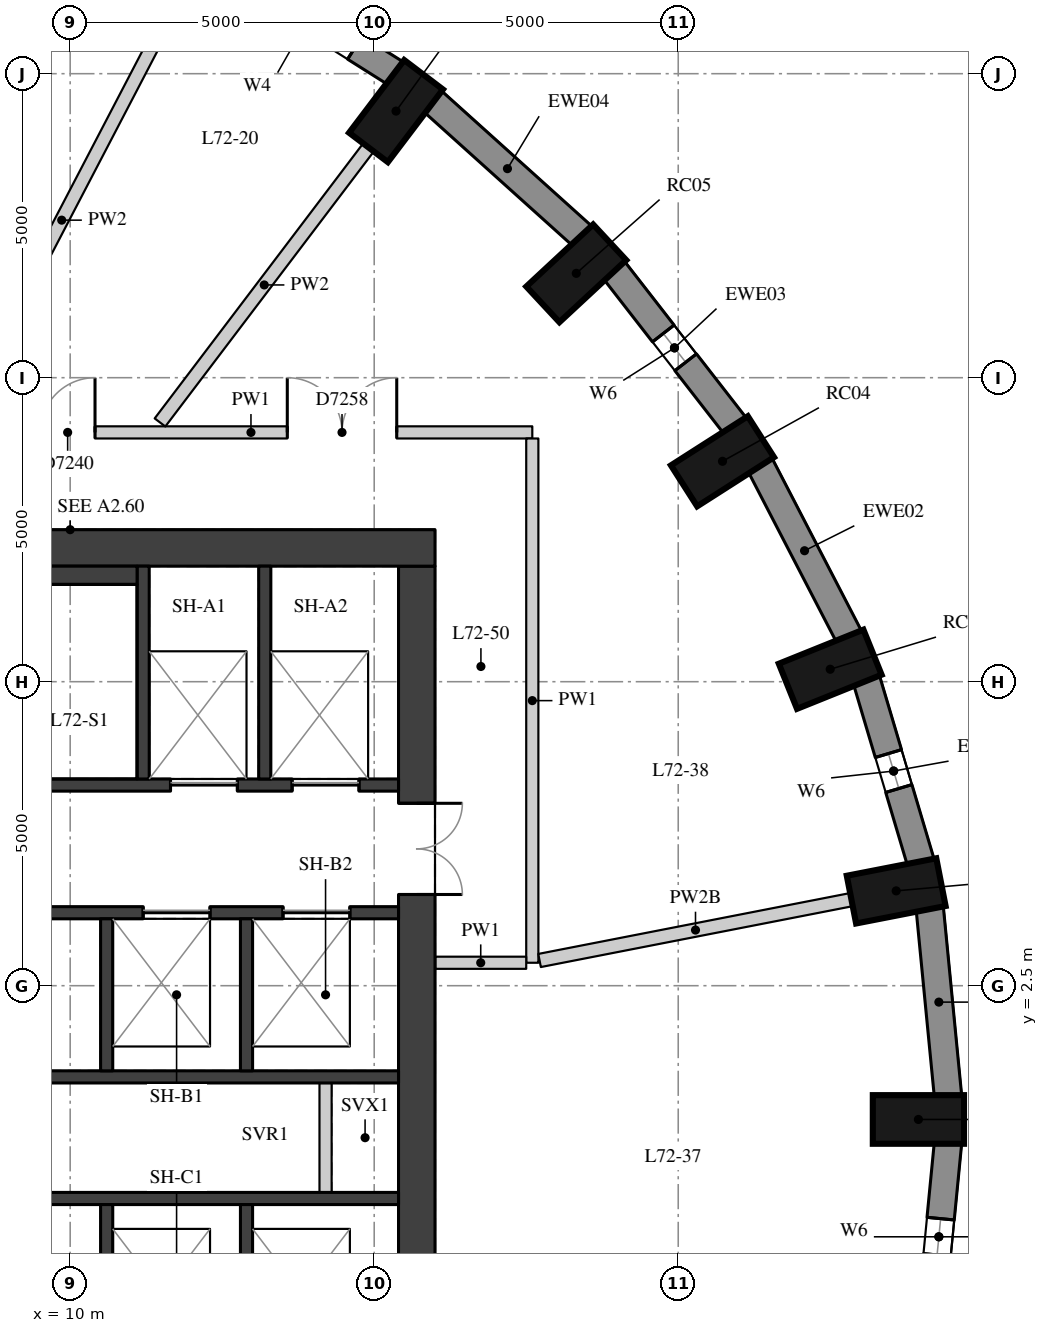
"""IFC4 building model, lengths in metres.
Left out: names, types, materials, properties, quantities, classifications, styles, units other than length and angle.
Written with IfcOpenShell. Run it as: python <this file> out.ifc"""

import sys

from ifc_helpers import new_model, si_unit, direction, frame, frame_2d, origin, origin_2d, place, context, subcontext, project, spatial, rectangle, extrude, element, fill, save


model = new_model("IFC4")
c1 = context("Model", 3, precision=1e-05, world=origin(), true_north=direction((0.0, 1.0)))
c2 = subcontext(c1, "Body", "Model", "MODEL_VIEW")
j1 = project(units=[si_unit("LENGTHUNIT", "METRE"), si_unit("PLANEANGLEUNIT", "RADIAN")], contexts=[c1])
p1 = place(None, origin())
s1 = spatial("IfcSite", under=j1, at=p1, CompositionType="ELEMENT")
p2 = place(p1, origin())
s2 = spatial("IfcBuilding", under=s1, at=p2, CompositionType="ELEMENT")
p3 = place(p2, frame((0.0, 0.0, 253.1)))
s3 = spatial("IfcBuildingStorey", under=s2, at=p3, CompositionType="ELEMENT", Elevation=253.1)
for number, where, z_axis, x_axis in (
    (1, (23.95, 0.3, 0.0), (0.0, 0.0, 1.0), (1.0, 0.0, 0.0)),
    (2, (23.585, 4.06, 0.0), (0.0, 0.0, 1.0), (0.981, 0.192, 0.0)),
    (3, (22.5, 7.705, 0.0), (0.0, 0.0, 1.0), (0.928, 0.374, 0.0)),
    (4, (20.728, 11.125, 0.0), (0.0, 0.0, 1.0), (0.843, 0.539, 0.0)),
    (5, (18.323, 14.216, 0.0), (0.0, 0.0, 1.0), (0.733, 0.681, 0.0)),
    (6, (15.359, 16.885, 0.0), (0.0, 0.0, 1.0), (0.604, 0.797, 0.0)),
):
    element("IfcColumn", number, at=place(p3, frame(where, z_axis=z_axis, x_axis=x_axis)), inside=s3, PredefinedType="COLUMN", context=c2, shape_type="SweptSolid", body=[
        extrude(rectangle(XDim=1.5, YDim=0.8, at=origin_2d()), origin(), (0.0, 0.0, 1.0), 3.3),
    ])
p4 = place(p3, frame((24.437, 0.68, 0.0), z_axis=(0.0, 0.0, 1.0), x_axis=(-0.096740086873, 0.995309678237, 0.0)))
e7 = element("IfcWall", 7, at=p4, inside=s3, PredefinedType="SOLIDWALL", context=c2, shape_type="SweptSolid", body=[
    extrude(rectangle(XDim=3.114, YDim=0.45, at=frame_2d((1.557, 0.0))), origin(), (0.0, 0.0, 1.0), 3.02),
])
p5 = place(p3, frame((23.99, 4.526, 0.0), z_axis=(0.0, 0.0, 1.0), x_axis=(-0.285263800865, 0.958449040855, 0.0)))
e8 = element("IfcWall", 8, at=p5, inside=s3, PredefinedType="SOLIDWALL", context=c2, shape_type="SweptSolid", body=[
    extrude(rectangle(XDim=3.139, YDim=0.45, at=frame_2d((1.57, 0.0))), origin(), (0.0, 0.0, 1.0), 3.02),
])
p6 = place(p5, frame((1.27, 0.0, 0.4)))
e9 = element("IfcOpeningElement", 9, at=p6, cuts=e8, PredefinedType="OPENING", context=c2, shape_type="SweptSolid", body=[
    extrude(rectangle(XDim=0.6, YDim=1.75, at=frame_2d((0.3, 0.875))), frame((0.0, 0.235, 0.0), z_axis=(0.0, -1.0, 0.0), x_axis=(1.0, 0.0, 0.0)), (0.0, 0.0, 1.0), 0.47),
])
p7 = place(p3, frame((22.81, 8.24, 0.0), z_axis=(0.0, 0.0, 1.0), x_axis=(-0.459889857669, 0.887975967475, 0.0)))
e10 = element("IfcWall", 10, at=p7, inside=s3, PredefinedType="SOLIDWALL", context=c2, shape_type="SweptSolid", body=[
    extrude(rectangle(XDim=3.186, YDim=0.45, at=frame_2d((1.593, 0.0))), origin(), (0.0, 0.0, 1.0), 3.02),
])
p8 = place(p3, frame((20.935, 11.708, 0.0), z_axis=(0.0, 0.0, 1.0), x_axis=(-0.613862536705, 0.789412937587, 0.0)))
e11 = element("IfcWall", 11, at=p8, inside=s3, PredefinedType="SOLIDWALL", context=c2, shape_type="SweptSolid", body=[
    extrude(rectangle(XDim=3.247, YDim=0.45, at=frame_2d((1.624, 0.0))), origin(), (0.0, 0.0, 1.0), 3.02),
])
p9 = place(p8, frame((1.324, 0.0, 0.4)))
e12 = element("IfcOpeningElement", 12, at=p9, cuts=e11, PredefinedType="OPENING", context=c2, shape_type="SweptSolid", body=[
    extrude(rectangle(XDim=0.6, YDim=1.75, at=frame_2d((0.3, 0.875))), frame((0.0, 0.235, 0.0), z_axis=(0.0, -1.0, 0.0), x_axis=(1.0, 0.0, 0.0)), (0.0, 0.0, 1.0), 0.47),
])
p10 = place(p3, frame((18.424, 14.828, 0.0), z_axis=(0.0, 0.0, 1.0), x_axis=(-0.743166014219, 0.669107073128, 0.0)))
e13 = element("IfcWall", 13, at=p10, inside=s3, PredefinedType="SOLIDWALL", context=c2, shape_type="SweptSolid", body=[
    extrude(rectangle(XDim=3.316, YDim=0.45, at=frame_2d((1.658, 0.0))), origin(), (0.0, 0.0, 1.0), 3.02),
])
p11 = place(p3, frame((15.353, 17.506, 0.0), z_axis=(0.0, 0.0, 1.0), x_axis=(-0.845929139811, 0.53329531258, 0.0)))
e14 = element("IfcWall", 14, at=p11, inside=s3, PredefinedType="SOLIDWALL", context=c2, shape_type="SweptSolid", body=[
    extrude(rectangle(XDim=3.385, YDim=0.45, at=frame_2d((1.692, 0.0))), origin(), (0.0, 0.0, 1.0), 3.02),
])
p12 = place(p11, frame((0.792, 0.0, 0.4)))
e15 = element("IfcOpeningElement", 15, at=p12, cuts=e14, PredefinedType="OPENING", context=c2, shape_type="SweptSolid", body=[
    extrude(rectangle(XDim=1.8, YDim=1.75, at=frame_2d((0.9, 0.875))), frame((0.0, 0.235, 0.0), z_axis=(0.0, -1.0, 0.0), x_axis=(1.0, 0.0, 0.0)), (0.0, 0.0, 1.0), 0.47),
])
p13 = place(p3, frame((24.136, -3.18, 0.0), z_axis=(0.0, 0.0, 1.0), x_axis=(0.09673253904, 0.995310411827, 0.0)))
e16 = element("IfcWall", 16, at=p13, inside=s3, PredefinedType="SOLIDWALL", context=c2, shape_type="SweptSolid", body=[
    extrude(rectangle(XDim=3.115, YDim=0.45, at=frame_2d((1.557, 0.0))), origin(), (0.0, 0.0, 1.0), 3.02),
])
p14 = place(p13, frame((1.257, 0.0, 0.4)))
e17 = element("IfcOpeningElement", 17, at=p14, cuts=e16, PredefinedType="OPENING", context=c2, shape_type="SweptSolid", body=[
    extrude(rectangle(XDim=0.6, YDim=1.75, at=frame_2d((0.3, 0.875))), frame((0.0, 0.235, 0.0), z_axis=(0.0, -1.0, 0.0), x_axis=(1.0, 0.0, 0.0)), (0.0, 0.0, 1.0), 0.47),
])
p15 = place(p3, frame((15.7, -9.4, 0.0), z_axis=(0.0, 0.0, 1.0), x_axis=(0.0, 1.0, 0.0)))
e18 = element("IfcWall", 18, at=p15, inside=s3, PredefinedType="SHEAR", context=c2, shape_type="SweptSolid", body=[
    extrude(rectangle(XDim=18.8, YDim=0.6, at=frame_2d((9.4, 0.0))), origin(), (0.0, 0.0, 1.0), 3.02),
])
p16 = place(p15, frame((13.4, 0.0, 0.0)))
e19 = element("IfcOpeningElement", 19, at=p16, cuts=e18, PredefinedType="OPENING", context=c2, shape_type="SweptSolid", body=[
    extrude(rectangle(XDim=1.5, YDim=2.1, at=frame_2d((0.75, 1.05))), frame((0.0, 0.31, 0.0), z_axis=(0.0, -1.0, 0.0), x_axis=(1.0, 0.0, 0.0)), (0.0, 0.0, 1.0), 0.62),
])
p17 = place(p15, frame((3.9, 0.0, 0.0)))
e20 = element("IfcOpeningElement", 20, at=p17, cuts=e18, PredefinedType="OPENING", context=c2, shape_type="SweptSolid", body=[
    extrude(rectangle(XDim=1.5, YDim=2.1, at=frame_2d((0.75, 1.05))), frame((0.0, 0.31, 0.0), z_axis=(0.0, -1.0, 0.0), x_axis=(1.0, 0.0, 0.0)), (0.0, 0.0, 1.0), 0.62),
])
p18 = place(p3, frame((4.0, 9.7, 0.0), z_axis=(0.0, 0.0, 1.0), x_axis=(1.0, 0.0, 0.0)))
e21 = element("IfcWall", 21, at=p18, inside=s3, PredefinedType="SHEAR", context=c2, shape_type="SweptSolid", body=[
    extrude(rectangle(XDim=12.0, YDim=0.6, at=frame_2d((6.0, 0.0))), origin(), (0.0, 0.0, 1.0), 3.02),
])
p19 = place(p3, frame((4.6, 5.8, 0.0), z_axis=(0.0, 0.0, 1.0), x_axis=(1.0, 0.0, 0.0)))
e22 = element("IfcWall", 22, at=p19, inside=s3, PredefinedType="SHEAR", context=c2, shape_type="SweptSolid", body=[
    extrude(rectangle(XDim=10.8, YDim=0.2, at=frame_2d((5.4, 0.0))), origin(), (0.0, 0.0, 1.0), 3.02),
])
p20 = place(p19, frame((7.05, 0.0, 0.0)))
e23 = element("IfcOpeningElement", 23, at=p20, cuts=e22, PredefinedType="OPENING", context=c2, shape_type="SweptSolid", body=[
    extrude(rectangle(XDim=1.1, YDim=2.1, at=frame_2d((0.55, 1.05))), frame((0.0, 0.11, 0.0), z_axis=(0.0, -1.0, 0.0), x_axis=(1.0, 0.0, 0.0)), (0.0, 0.0, 1.0), 0.22),
])
p21 = place(p19, frame((9.05, 0.0, 0.0)))
e24 = element("IfcOpeningElement", 24, at=p21, cuts=e22, PredefinedType="OPENING", context=c2, shape_type="SweptSolid", body=[
    extrude(rectangle(XDim=1.1, YDim=2.1, at=frame_2d((0.55, 1.05))), frame((0.0, 0.11, 0.0), z_axis=(0.0, -1.0, 0.0), x_axis=(1.0, 0.0, 0.0)), (0.0, 0.0, 1.0), 0.22),
])
p22 = place(p3, frame((4.6, 3.7, 0.0), z_axis=(0.0, 0.0, 1.0), x_axis=(1.0, 0.0, 0.0)))
e25 = element("IfcWall", 25, at=p22, inside=s3, PredefinedType="SHEAR", context=c2, shape_type="SweptSolid", body=[
    extrude(rectangle(XDim=10.8, YDim=0.2, at=frame_2d((5.4, 0.0))), origin(), (0.0, 0.0, 1.0), 3.02),
])
p23 = place(p22, frame((6.6, 0.0, 0.0)))
e26 = element("IfcOpeningElement", 26, at=p23, cuts=e25, PredefinedType="OPENING", context=c2, shape_type="SweptSolid", body=[
    extrude(rectangle(XDim=1.1, YDim=2.1, at=frame_2d((0.55, 1.05))), frame((0.0, 0.11, 0.0), z_axis=(0.0, -1.0, 0.0), x_axis=(1.0, 0.0, 0.0)), (0.0, 0.0, 1.0), 0.22),
])
p24 = place(p22, frame((8.9, 0.0, 0.0)))
e27 = element("IfcOpeningElement", 27, at=p24, cuts=e25, PredefinedType="OPENING", context=c2, shape_type="SweptSolid", body=[
    extrude(rectangle(XDim=1.1, YDim=2.1, at=frame_2d((0.55, 1.05))), frame((0.0, 0.11, 0.0), z_axis=(0.0, -1.0, 0.0), x_axis=(1.0, 0.0, 0.0)), (0.0, 0.0, 1.0), 0.22),
])
for number, where, z_axis, x_axis in (
    (28, (4.6, 1.0, 0.0), (0.0, 0.0, 1.0), (1.0, 0.0, 0.0)),
    (29, (4.6, -1.0, 0.0), (0.0, 0.0, 1.0), (1.0, 0.0, 0.0)),
):
    element("IfcWall", number, at=place(p3, frame(where, z_axis=z_axis, x_axis=x_axis)), inside=s3, PredefinedType="SHEAR", context=c2, shape_type="SweptSolid", body=[
        extrude(rectangle(XDim=10.8, YDim=0.2, at=frame_2d((5.4, 0.0))), origin(), (0.0, 0.0, 1.0), 3.02),
    ])
for number, where, z_axis, x_axis in (
    (30, (11.2, 5.9, 0.0), (0.0, 0.0, 1.0), (0.0, 1.0, 0.0)),
    (31, (13.2, 5.9, 0.0), (0.0, 0.0, 1.0), (0.0, 1.0, 0.0)),
):
    element("IfcWall", number, at=place(p3, frame(where, z_axis=z_axis, x_axis=x_axis)), inside=s3, PredefinedType="SHEAR", context=c2, shape_type="SweptSolid", body=[
        extrude(rectangle(XDim=3.5, YDim=0.2, at=frame_2d((1.75, 0.0))), origin(), (0.0, 0.0, 1.0), 3.02),
    ])
for number, where, z_axis, x_axis in (
    (32, (10.6, 1.1, 0.0), (0.0, 0.0, 1.0), (0.0, 1.0, 0.0)),
    (33, (10.6, -3.6, 0.0), (0.0, 0.0, 1.0), (0.0, 1.0, 0.0)),
    (34, (12.9, 1.1, 0.0), (0.0, 0.0, 1.0), (0.0, 1.0, 0.0)),
    (35, (12.9, -3.6, 0.0), (0.0, 0.0, 1.0), (0.0, 1.0, 0.0)),
):
    element("IfcWall", number, at=place(p3, frame(where, z_axis=z_axis, x_axis=x_axis)), inside=s3, PredefinedType="SHEAR", context=c2, shape_type="SweptSolid", body=[
        extrude(rectangle(XDim=2.5, YDim=0.2, at=frame_2d((1.25, 0.0))), origin(), (0.0, 0.0, 1.0), 3.02),
    ])
p25 = place(p3, frame((14.2, -0.9, 0.0), z_axis=(0.0, 0.0, 1.0), x_axis=(0.0, 1.0, 0.0)))
e36 = element("IfcWall", 36, at=p25, inside=s3, PredefinedType="PARTITIONING", context=c2, shape_type="SweptSolid", body=[
    extrude(rectangle(XDim=1.8, YDim=0.2, at=frame_2d((0.9, 0.0))), origin(), (0.0, 0.0, 1.0), 3.02),
])
p26 = place(p3, frame((6.22, 9.25, 0.0), z_axis=(0.0, 0.0, 1.0), x_axis=(1.0, 0.0, 0.0)))
e37 = element("IfcWall", 37, at=p26, inside=s3, PredefinedType="PARTITIONING", context=c2, shape_type="SweptSolid", body=[
    extrude(rectangle(XDim=4.88, YDim=0.3, at=frame_2d((2.44, 0.0))), origin(), (0.0, 0.0, 1.0), 3.02),
])
p27 = place(p3, frame((8.346, 11.6, 0.0), z_axis=(0.0, 0.0, 1.0), x_axis=(1.0, 0.0, 0.0)))
e38 = element("IfcWall", 38, at=p27, inside=s3, PredefinedType="PARTITIONING", context=c2, shape_type="SweptSolid", body=[
    extrude(rectangle(XDim=9.254, YDim=0.2, at=frame_2d((4.627, 0.0))), origin(), (0.0, 0.0, 1.0), 3.02),
])
p28 = place(p27, frame((1.162, 0.0, 0.0)))
e39 = element("IfcOpeningElement", 39, at=p28, cuts=e38, PredefinedType="OPENING", context=c2, shape_type="SweptSolid", body=[
    extrude(rectangle(XDim=0.9, YDim=2.1, at=frame_2d((0.45, 1.05))), frame((0.0, 0.11, 0.0), z_axis=(0.0, -1.0, 0.0), x_axis=(1.0, 0.0, 0.0)), (0.0, 0.0, 1.0), 0.22),
])
p29 = place(p27, frame((5.224, 0.0, 0.0)))
e40 = element("IfcOpeningElement", 40, at=p29, cuts=e38, PredefinedType="OPENING", context=c2, shape_type="SweptSolid", body=[
    extrude(rectangle(XDim=1.8, YDim=2.1, at=frame_2d((0.9, 1.05))), frame((0.0, 0.11, 0.0), z_axis=(0.0, -1.0, 0.0), x_axis=(1.0, 0.0, 0.0)), (0.0, 0.0, 1.0), 0.22),
])
p30 = place(p3, frame((17.6, 11.5, 0.0), z_axis=(0.0, 0.0, 1.0), x_axis=(0.0, -1.0, 0.0)))
e41 = element("IfcWall", 41, at=p30, inside=s3, PredefinedType="PARTITIONING", context=c2, shape_type="SweptSolid", body=[
    extrude(rectangle(XDim=8.623, YDim=0.2, at=frame_2d((4.312, 0.0))), origin(), (0.0, 0.0, 1.0), 3.02),
])
p31 = place(p3, frame((17.5, 2.877, 0.0), z_axis=(0.0, 0.0, 1.0), x_axis=(-1.0, 0.0, 0.0)))
e42 = element("IfcWall", 42, at=p31, inside=s3, PredefinedType="PARTITIONING", context=c2, shape_type="SweptSolid", body=[
    extrude(rectangle(XDim=1.496, YDim=0.2, at=frame_2d((0.748, 0.0))), origin(), (0.0, 0.0, 1.0), 3.02),
])
p32 = place(p3, frame((22.849, 3.916, 0.0), z_axis=(0.0, 0.0, 1.0), x_axis=(-0.981474096155, -0.191594881394, 0.0)))
e43 = element("IfcWall", 43, at=p32, inside=s3, PredefinedType="PARTITIONING", context=c2, shape_type="SweptSolid", body=[
    extrude(rectangle(XDim=5.226, YDim=0.22, at=frame_2d((2.613, 0.0))), origin(), (0.0, 0.0, 1.0), 2.57),
])
p33 = place(p3, frame((14.906, 16.287, 0.0), z_axis=(0.0, 0.0, 1.0), x_axis=(-0.604066355306, -0.796934023861, 0.0)))
e44 = element("IfcWall", 44, at=p33, inside=s3, PredefinedType="PARTITIONING", context=c2, shape_type="SweptSolid", body=[
    extrude(rectangle(XDim=5.676, YDim=0.22, at=frame_2d((2.838, 0.0))), origin(), (0.0, 0.0, 1.0), 3.02),
])
p34 = place(p3, frame((11.578, 18.385, 0.0), z_axis=(0.0, 0.0, 1.0), x_axis=(-0.462371689287, -0.886686202073, 0.0)))
e45 = element("IfcWall", 45, at=p34, inside=s3, PredefinedType="PARTITIONING", context=c2, shape_type="SweptSolid", body=[
    extrude(rectangle(XDim=7.429, YDim=0.22, at=frame_2d((3.714, 0.0))), origin(), (0.0, 0.0, 1.0), 3.02),
])
p35 = place(p6, origin())
e46 = element("IfcWindow", 46, at=p35, inside=s3, PartitioningType="SINGLE_PANEL", PredefinedType="WINDOW", context=c2, shape_type="SweptSolid", body=[
    extrude(rectangle(XDim=0.6, YDim=1.75, at=frame_2d((0.3, 0.875))), frame((0.0, 0.035, 0.0), z_axis=(0.0, -1.0, 0.0), x_axis=(1.0, 0.0, 0.0)), (0.0, 0.0, 1.0), 0.06),
])
fill(e9, e46)
p36 = place(p9, origin())
e47 = element("IfcWindow", 47, at=p36, inside=s3, PartitioningType="SINGLE_PANEL", PredefinedType="WINDOW", context=c2, shape_type="SweptSolid", body=[
    extrude(rectangle(XDim=0.6, YDim=1.75, at=frame_2d((0.3, 0.875))), frame((0.0, 0.035, 0.0), z_axis=(0.0, -1.0, 0.0), x_axis=(1.0, 0.0, 0.0)), (0.0, 0.0, 1.0), 0.06),
])
fill(e12, e47)
p37 = place(p14, origin())
e48 = element("IfcWindow", 48, at=p37, inside=s3, PartitioningType="SINGLE_PANEL", PredefinedType="WINDOW", context=c2, shape_type="SweptSolid", body=[
    extrude(rectangle(XDim=0.6, YDim=1.75, at=frame_2d((0.3, 0.875))), frame((0.0, 0.035, 0.0), z_axis=(0.0, -1.0, 0.0), x_axis=(1.0, 0.0, 0.0)), (0.0, 0.0, 1.0), 0.06),
])
fill(e17, e48)
p38 = place(p16, origin())
e49 = element("IfcDoor", 49, at=p38, inside=s3, OperationType="DOUBLE_DOOR_SINGLE_SWING", PredefinedType="DOOR", context=c2, shape_type="SweptSolid", body=[
    extrude(rectangle(XDim=1.5, YDim=2.1, at=frame_2d((0.75, 1.05))), frame((0.0, 0.025, 0.0), z_axis=(0.0, -1.0, 0.0), x_axis=(1.0, 0.0, 0.0)), (0.0, 0.0, 1.0), 0.05),
])
fill(e19, e49)
p39 = place(p20, origin())
e50 = element("IfcDoor", 50, at=p39, inside=s3, OperationType="DOUBLE_DOOR_SLIDING", PredefinedType="DOOR", context=c2, shape_type="SweptSolid", body=[
    extrude(rectangle(XDim=1.1, YDim=2.1, at=frame_2d((0.55, 1.05))), frame((0.0, 0.025, 0.0), z_axis=(0.0, -1.0, 0.0), x_axis=(1.0, 0.0, 0.0)), (0.0, 0.0, 1.0), 0.05),
])
fill(e23, e50)
p40 = place(p21, origin())
e51 = element("IfcDoor", 51, at=p40, inside=s3, OperationType="DOUBLE_DOOR_SLIDING", PredefinedType="DOOR", context=c2, shape_type="SweptSolid", body=[
    extrude(rectangle(XDim=1.1, YDim=2.1, at=frame_2d((0.55, 1.05))), frame((0.0, 0.025, 0.0), z_axis=(0.0, -1.0, 0.0), x_axis=(1.0, 0.0, 0.0)), (0.0, 0.0, 1.0), 0.05),
])
fill(e24, e51)
p41 = place(p23, origin())
e52 = element("IfcDoor", 52, at=p41, inside=s3, OperationType="DOUBLE_DOOR_SLIDING", PredefinedType="DOOR", context=c2, shape_type="SweptSolid", body=[
    extrude(rectangle(XDim=1.1, YDim=2.1, at=frame_2d((0.55, 1.05))), frame((0.0, 0.025, 0.0), z_axis=(0.0, -1.0, 0.0), x_axis=(1.0, 0.0, 0.0)), (0.0, 0.0, 1.0), 0.05),
])
fill(e26, e52)
p42 = place(p24, origin())
e53 = element("IfcDoor", 53, at=p42, inside=s3, OperationType="DOUBLE_DOOR_SLIDING", PredefinedType="DOOR", context=c2, shape_type="SweptSolid", body=[
    extrude(rectangle(XDim=1.1, YDim=2.1, at=frame_2d((0.55, 1.05))), frame((0.0, 0.025, 0.0), z_axis=(0.0, -1.0, 0.0), x_axis=(1.0, 0.0, 0.0)), (0.0, 0.0, 1.0), 0.05),
])
fill(e27, e53)
p43 = place(p28, origin())
e54 = element("IfcDoor", 54, at=p43, inside=s3, OperationType="SINGLE_SWING_RIGHT", PredefinedType="DOOR", context=c2, shape_type="SweptSolid", body=[
    extrude(rectangle(XDim=0.9, YDim=2.1, at=frame_2d((0.45, 1.05))), frame((0.0, 0.025, 0.0), z_axis=(0.0, -1.0, 0.0), x_axis=(1.0, 0.0, 0.0)), (0.0, 0.0, 1.0), 0.05),
])
fill(e39, e54)
p44 = place(p29, origin())
e55 = element("IfcDoor", 55, at=p44, inside=s3, OperationType="DOUBLE_DOOR_SINGLE_SWING", PredefinedType="DOOR", context=c2, shape_type="SweptSolid", body=[
    extrude(rectangle(XDim=1.8, YDim=2.1, at=frame_2d((0.9, 1.05))), frame((0.0, 0.025, 0.0), z_axis=(0.0, -1.0, 0.0), x_axis=(1.0, 0.0, 0.0)), (0.0, 0.0, 1.0), 0.05),
])
fill(e40, e55)
save(model, sys.argv[1])
